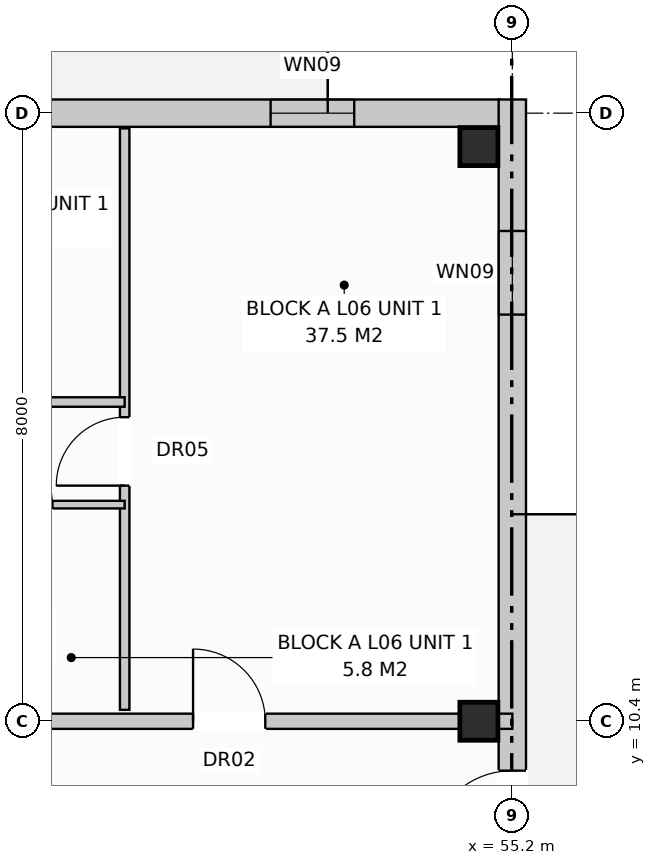
"""IFC4 building model, lengths in metres.
Left out: names, types, materials, properties, quantities, classifications, styles, units other than length and angle.
Written with IfcOpenShell. Run it as: python <this file> out.ifc"""

import sys

from ifc_helpers import new_model, si_unit, direction, frame, frame_2d, origin, origin_with_axes, origin_2d, place, context, subcontext, project, spatial, rectangle, extrude, element, fill, save


model = new_model("IFC4")
c1 = context("Model", 3, precision=1e-05, world=origin(), true_north=direction((0.0, 1.0)))
c2 = subcontext(c1, "Body", "Model", "MODEL_VIEW")
j1 = project(units=[si_unit("LENGTHUNIT", "METRE"), si_unit("PLANEANGLEUNIT", "RADIAN")], contexts=[c1])
p1 = place(None, origin())
s1 = spatial("IfcSite", under=j1, at=p1, CompositionType="ELEMENT")
p2 = place(p1, origin())
s2 = spatial("IfcBuilding", under=s1, at=p2, CompositionType="ELEMENT")
p3 = place(p2, frame((0.0, 0.0, 20.8)))
s3 = spatial("IfcBuildingStorey", under=s2, at=p3, CompositionType="ELEMENT", Elevation=20.8)
for number, where, z_axis, x_axis in (
    (1, (54.76, 10.4, 0.0), (0.0, 0.0, 1.0), (1.0, 0.0, 0.0)),
    (2, (54.76, 17.96, 0.0), (0.0, 0.0, 1.0), (1.0, 0.0, 0.0)),
):
    element("IfcColumn", number, at=place(p3, frame(where, z_axis=z_axis, x_axis=x_axis)), inside=s3, PredefinedType="COLUMN", context=c2, shape_type="SweptSolid", body=[
        extrude(rectangle(XDim=0.5, YDim=0.5, at=origin_2d()), origin(), (0.0, 0.0, 1.0), 3.2),
    ])
p4 = place(p3, frame((31.35, 18.4, 0.0), z_axis=(0.0, 0.0, 1.0), x_axis=(1.0, 0.0, 0.0)))
e3 = element("IfcWall", 3, at=p4, inside=s3, PredefinedType="STANDARD", context=c2, shape_type="SweptSolid", body=[
    extrude(rectangle(XDim=23.68, YDim=0.36, at=frame_2d((11.84, 0.0))), origin(), (0.0, 0.0, 1.0), 2.95),
])
p5 = place(p4, frame((12.999, 0.0, 0.0)))
e4 = element("IfcOpeningElement", 4, at=p5, cuts=e3, PredefinedType="OPENING", context=c2, shape_type="SweptSolid", body=[
    extrude(rectangle(XDim=1.05, YDim=2.12, at=frame_2d((0.525, 1.06))), frame((0.0, 0.192, 0.0), z_axis=(0.0, -1.0, 0.0), x_axis=(1.0, 0.0, 0.0)), (0.0, 0.0, 1.0), 0.384),
])
p6 = place(p4, frame((10.87, 0.0, 0.8)))
e5 = element("IfcOpeningElement", 5, at=p6, cuts=e3, PredefinedType="OPENING", context=c2, shape_type="SweptSolid", body=[
    extrude(rectangle(XDim=1.9, YDim=1.85, at=frame_2d((0.95, 0.925))), frame((0.0, 0.192, 0.0), z_axis=(0.0, -1.0, 0.0), x_axis=(1.0, 0.0, 0.0)), (0.0, 0.0, 1.0), 0.384),
])
p7 = place(p4, frame((14.545, 0.0, 0.8)))
e6 = element("IfcOpeningElement", 6, at=p7, cuts=e3, PredefinedType="OPENING", context=c2, shape_type="SweptSolid", body=[
    extrude(rectangle(XDim=1.95, YDim=1.65, at=frame_2d((0.975, 0.825))), frame((0.0, 0.192, 0.0), z_axis=(0.0, -1.0, 0.0), x_axis=(1.0, 0.0, 0.0)), (0.0, 0.0, 1.0), 0.384),
])
p8 = place(p4, frame((20.67, 0.0, 0.72)))
e7 = element("IfcOpeningElement", 7, at=p8, cuts=e3, PredefinedType="OPENING", context=c2, shape_type="SweptSolid", body=[
    extrude(rectangle(XDim=1.1, YDim=1.5, at=frame_2d((0.55, 0.75))), frame((0.0, 0.192, 0.0), z_axis=(0.0, -1.0, 0.0), x_axis=(1.0, 0.0, 0.0)), (0.0, 0.0, 1.0), 0.384),
])
p9 = place(p3, frame((55.2, -0.18, 0.0), z_axis=(0.0, 0.0, 1.0), x_axis=(0.0, 1.0, 0.0)))
e8 = element("IfcWall", 8, at=p9, inside=s3, PredefinedType="STANDARD", context=c2, shape_type="SweptSolid", body=[
    extrude(rectangle(XDim=18.76, YDim=0.36, at=frame_2d((9.38, 0.0))), origin(), (0.0, 0.0, 1.0), 2.95),
])
p10 = place(p9, frame((8.83, 0.0, 0.0)))
e9 = element("IfcOpeningElement", 9, at=p10, cuts=e8, PredefinedType="OPENING", context=c2, shape_type="SweptSolid", body=[
    extrude(rectangle(XDim=1.1, YDim=2.1, at=frame_2d((0.55, 1.05))), frame((0.0, 0.192, 0.0), z_axis=(0.0, -1.0, 0.0), x_axis=(1.0, 0.0, 0.0)), (0.0, 0.0, 1.0), 0.384),
])
p11 = place(p9, frame((1.73, 0.0, 0.72)))
e10 = element("IfcOpeningElement", 10, at=p11, cuts=e8, PredefinedType="OPENING", context=c2, shape_type="SweptSolid", body=[
    extrude(rectangle(XDim=1.1, YDim=1.5, at=frame_2d((0.55, 0.75))), frame((0.0, 0.192, 0.0), z_axis=(0.0, -1.0, 0.0), x_axis=(1.0, 0.0, 0.0)), (0.0, 0.0, 1.0), 0.384),
])
p12 = place(p9, frame((15.93, 0.0, 0.72)))
e11 = element("IfcOpeningElement", 11, at=p12, cuts=e8, PredefinedType="OPENING", context=c2, shape_type="SweptSolid", body=[
    extrude(rectangle(XDim=1.1, YDim=1.5, at=frame_2d((0.55, 0.75))), frame((0.0, 0.192, 0.0), z_axis=(0.0, -1.0, 0.0), x_axis=(1.0, 0.0, 0.0)), (0.0, 0.0, 1.0), 0.384),
])
p13 = place(p3, frame((41.4, 10.4, 0.0), z_axis=(0.0, 0.0, 1.0), x_axis=(1.0, 0.0, 0.0)))
e12 = element("IfcWall", 12, at=p13, inside=s3, PredefinedType="PARTITIONING", context=c2, shape_type="SweptSolid", body=[
    extrude(rectangle(XDim=13.8, YDim=0.2, at=frame_2d((6.9, 0.0))), origin(), (0.0, 0.0, 1.0), 2.39),
])
p14 = place(p13, frame((9.6, 0.0, 0.0)))
e13 = element("IfcOpeningElement", 13, at=p14, cuts=e12, PredefinedType="OPENING", context=c2, shape_type="SweptSolid", body=[
    extrude(rectangle(XDim=0.95, YDim=2.15, at=frame_2d((0.475, 1.075))), frame((0.0, 0.112, 0.0), z_axis=(0.0, -1.0, 0.0), x_axis=(1.0, 0.0, 0.0)), (0.0, 0.0, 1.0), 0.224),
])
p15 = place(p3, frame((50.1, 10.55, 0.0), z_axis=(0.0, 0.0, 1.0), x_axis=(0.0, 1.0, 0.0)))
e14 = element("IfcWall", 14, at=p15, inside=s3, PredefinedType="PARTITIONING", context=c2, shape_type="SweptSolid", body=[
    extrude(rectangle(XDim=7.65, YDim=0.125, at=frame_2d((3.825, 0.0))), origin(), (0.0, 0.0, 1.0), 2.95),
])
p16 = place(p15, frame((2.95, 0.0, 0.0)))
e15 = element("IfcOpeningElement", 15, at=p16, cuts=e14, PredefinedType="OPENING", context=c2, shape_type="SweptSolid", body=[
    extrude(rectangle(XDim=0.9, YDim=2.1, at=frame_2d((0.45, 1.05))), frame((0.0, 0.074, 0.0), z_axis=(0.0, -1.0, 0.0), x_axis=(1.0, 0.0, 0.0)), (0.0, 0.0, 1.0), 0.149),
])
p17 = place(p3, frame((41.5, 13.25, 0.0), z_axis=(0.0, 0.0, 1.0), x_axis=(1.0, 0.0, 0.0)))
e16 = element("IfcWall", 16, at=p17, inside=s3, PredefinedType="PARTITIONING", context=c2, shape_type="SweptSolid", body=[
    extrude(rectangle(XDim=8.6, YDim=0.1, at=frame_2d((4.3, 0.0))), origin(), (0.0, 0.0, 1.0), 2.95),
])
p18 = place(p17, frame((1.4, 0.0, 0.0)))
e17 = element("IfcOpeningElement", 17, at=p18, cuts=e16, PredefinedType="OPENING", context=c2, shape_type="SweptSolid", body=[
    extrude(rectangle(XDim=0.85, YDim=2.05, at=frame_2d((0.425, 1.025))), frame((0.0, 0.062, 0.0), z_axis=(0.0, -1.0, 0.0), x_axis=(1.0, 0.0, 0.0)), (0.0, 0.0, 1.0), 0.124),
])
p19 = place(p17, frame((4.65, 0.0, 0.0)))
e18 = element("IfcOpeningElement", 18, at=p19, cuts=e16, PredefinedType="OPENING", context=c2, shape_type="SweptSolid", body=[
    extrude(rectangle(XDim=0.85, YDim=2.05, at=frame_2d((0.425, 1.025))), frame((0.0, 0.062, 0.0), z_axis=(0.0, -1.0, 0.0), x_axis=(1.0, 0.0, 0.0)), (0.0, 0.0, 1.0), 0.124),
])
p20 = place(p17, frame((6.8, 0.0, 0.0)))
e19 = element("IfcOpeningElement", 19, at=p20, cuts=e16, PredefinedType="OPENING", context=c2, shape_type="SweptSolid", body=[
    extrude(rectangle(XDim=0.85, YDim=2.1, at=frame_2d((0.425, 1.05))), frame((0.0, 0.062, 0.0), z_axis=(0.0, -1.0, 0.0), x_axis=(1.0, 0.0, 0.0)), (0.0, 0.0, 1.0), 0.124),
])
p21 = place(p3, frame((45.6, 14.6, 0.0), z_axis=(0.0, 0.0, 1.0), x_axis=(1.0, 0.0, 0.0)))
e20 = element("IfcWall", 20, at=p21, inside=s3, PredefinedType="PARTITIONING", context=c2, shape_type="SweptSolid", body=[
    extrude(rectangle(XDim=4.5, YDim=0.125, at=frame_2d((2.25, 0.0))), origin(), (0.0, 0.0, 1.0), 2.95),
])
p22 = place(p21, frame((1.6, 0.0, 0.0)))
e21 = element("IfcOpeningElement", 21, at=p22, cuts=e20, PredefinedType="OPENING", context=c2, shape_type="SweptSolid", body=[
    extrude(rectangle(XDim=0.9, YDim=2.1, at=frame_2d((0.45, 1.05))), frame((0.0, 0.074, 0.0), z_axis=(0.0, -1.0, 0.0), x_axis=(1.0, 0.0, 0.0)), (0.0, 0.0, 1.0), 0.149),
])
p23 = place(p8, origin_with_axes())
e22 = element("IfcWindow", 22, at=p23, inside=s3, PartitioningType="SINGLE_PANEL", PredefinedType="WINDOW", context=c2, shape_type="SweptSolid", body=[
    extrude(rectangle(XDim=1.1, YDim=1.5, at=frame_2d((0.55, 0.75))), frame((0.0, 0.03, 0.0), z_axis=(0.0, -1.0, 0.0), x_axis=(1.0, 0.0, 0.0)), (0.0, 0.0, 1.0), 0.06),
])
fill(e7, e22)
p24 = place(p10, origin_with_axes())
e23 = element("IfcDoor", 23, at=p24, inside=s3, OperationType="SINGLE_SWING_LEFT", PredefinedType="DOOR", context=c2, shape_type="SweptSolid", body=[
    extrude(rectangle(XDim=1.1, YDim=2.1, at=frame_2d((0.55, 1.05))), frame((0.0, 0.025, 0.0), z_axis=(0.0, -1.0, 0.0), x_axis=(1.0, 0.0, 0.0)), (0.0, 0.0, 1.0), 0.05),
])
fill(e9, e23)
p25 = place(p12, origin_with_axes())
e24 = element("IfcWindow", 24, at=p25, inside=s3, PartitioningType="SINGLE_PANEL", PredefinedType="WINDOW", context=c2, shape_type="SweptSolid", body=[
    extrude(rectangle(XDim=1.1, YDim=1.5, at=frame_2d((0.55, 0.75))), frame((0.0, 0.03, 0.0), z_axis=(0.0, -1.0, 0.0), x_axis=(1.0, 0.0, 0.0)), (0.0, 0.0, 1.0), 0.06),
])
fill(e11, e24)
p26 = place(p14, origin_with_axes())
e25 = element("IfcDoor", 25, at=p26, inside=s3, OperationType="SINGLE_SWING_LEFT", PredefinedType="DOOR", context=c2, shape_type="SweptSolid", body=[
    extrude(rectangle(XDim=0.95, YDim=2.15, at=frame_2d((0.475, 1.075))), frame((0.0, 0.025, 0.0), z_axis=(0.0, -1.0, 0.0), x_axis=(1.0, 0.0, 0.0)), (0.0, 0.0, 1.0), 0.05),
])
fill(e13, e25)
p27 = place(p16, origin_with_axes())
e26 = element("IfcDoor", 26, at=p27, inside=s3, OperationType="SINGLE_SWING_LEFT", PredefinedType="DOOR", context=c2, shape_type="SweptSolid", body=[
    extrude(rectangle(XDim=0.9, YDim=2.1, at=frame_2d((0.45, 1.05))), frame((0.0, 0.025, 0.0), z_axis=(0.0, -1.0, 0.0), x_axis=(1.0, 0.0, 0.0)), (0.0, 0.0, 1.0), 0.05),
])
fill(e15, e26)
p28 = place(p20, origin_with_axes())
e27 = element("IfcDoor", 27, at=p28, inside=s3, OperationType="SINGLE_SWING_LEFT", PredefinedType="DOOR", context=c2, shape_type="SweptSolid", body=[
    extrude(rectangle(XDim=0.85, YDim=2.1, at=frame_2d((0.425, 1.05))), frame((0.0, 0.025, 0.0), z_axis=(0.0, -1.0, 0.0), x_axis=(1.0, 0.0, 0.0)), (0.0, 0.0, 1.0), 0.05),
])
fill(e19, e27)
save(model, sys.argv[1])
